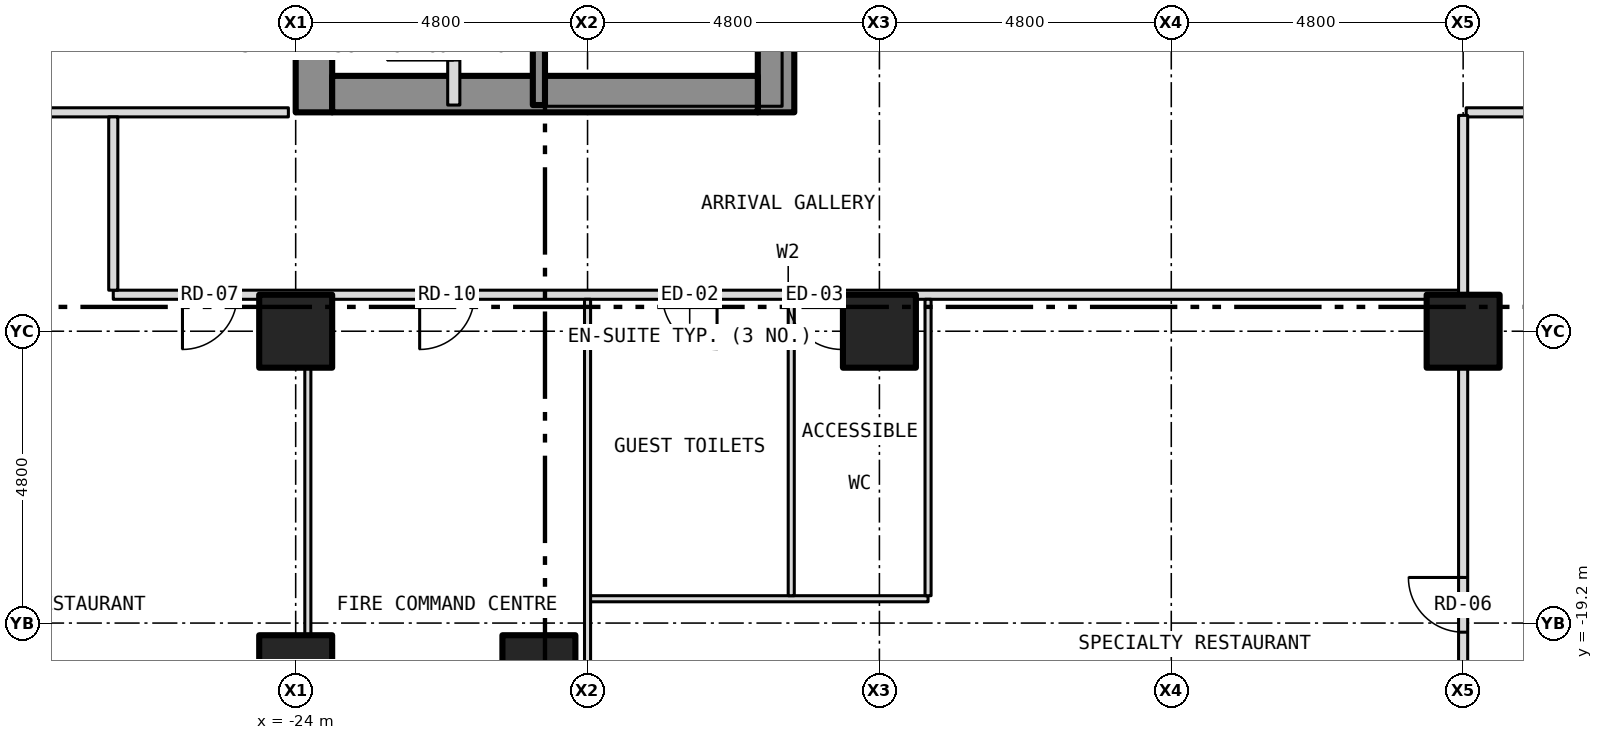
"""IFC4 building model, lengths in metres.
Left out: names, types, materials, properties, quantities, classifications, styles, units other than length and angle.
Written with IfcOpenShell. Run it as: python <this file> out.ifc"""

import sys

from ifc_helpers import new_model, si_unit, direction, frame, frame_2d, origin, origin_2d, place, context, subcontext, project, spatial, rectangle, hollow_rectangle, extrude, element, fill, save


model = new_model("IFC4")
c1 = context("Model", 3, precision=1e-05, world=origin(), true_north=direction((0.0, 1.0)))
c2 = subcontext(c1, "Body", "Model", "MODEL_VIEW")
j1 = project(units=[si_unit("LENGTHUNIT", "METRE"), si_unit("PLANEANGLEUNIT", "RADIAN")], contexts=[c1])
p1 = place(None, origin())
s1 = spatial("IfcSite", under=j1, at=p1, CompositionType="ELEMENT")
p2 = place(p1, origin())
s2 = spatial("IfcBuilding", under=s1, at=p2, CompositionType="ELEMENT")
p3 = place(p2, origin())
s3 = spatial("IfcBuildingStorey", under=s2, at=p3, CompositionType="ELEMENT", Elevation=0.0)
for number, where, z_axis, x_axis in (
    (1, (-24.0, -20.0, -0.3), (0.0, 0.0, 1.0), (1.0, 0.0, 0.0)),
    (2, (-24.0, -14.4, -0.3), (0.0, 0.0, 1.0), (1.0, 0.0, 0.0)),
    (3, (-20.0, -20.0, -0.3), (0.0, 0.0, 1.0), (1.0, 0.0, 0.0)),
    (4, (-14.4, -14.4, -0.3), (0.0, 0.0, 1.0), (1.0, 0.0, 0.0)),
    (5, (-4.8, -14.4, -0.3), (0.0, 0.0, 1.0), (1.0, 0.0, 0.0)),
):
    element("IfcColumn", number, at=place(p3, frame(where, z_axis=z_axis, x_axis=x_axis)), inside=s3, PredefinedType="COLUMN", context=c2, shape_type="SweptSolid", body=[
        extrude(hollow_rectangle(XDim=1.2, YDim=1.2, WallThickness=0.07, at=origin_2d()), origin(), (0.0, 0.0, 1.0), 7.55),
    ])
p4 = place(p3, frame((-16.1, -10.8, 0.0), z_axis=(0.0, 0.0, 1.0), x_axis=(0.0, 1.0, 0.0)))
e6 = element("IfcWall", 6, at=p4, inside=s3, PredefinedType="SHEAR", context=c2, shape_type="SweptSolid", body=[
    extrude(rectangle(XDim=21.6, YDim=0.6, at=frame_2d((10.8, 0.0))), origin(), (0.0, 0.0, 1.0), 7.2),
])
p5 = place(p4, frame((9.4, 0.0, 0.0)))
e7 = element("IfcOpeningElement", 7, at=p5, cuts=e6, PredefinedType="OPENING", context=c2, shape_type="SweptSolid", body=[
    extrude(rectangle(XDim=1.1, YDim=2.1, at=frame_2d((0.55, 1.05))), frame((0.0, 0.312, 0.0), z_axis=(0.0, -1.0, 0.0), x_axis=(1.0, 0.0, 0.0)), (0.0, 0.0, 1.0), 0.624),
])
p6 = place(p4, frame((11.5, 0.0, 0.0)))
e8 = element("IfcOpeningElement", 8, at=p6, cuts=e6, PredefinedType="OPENING", context=c2, shape_type="SweptSolid", body=[
    extrude(rectangle(XDim=1.1, YDim=2.1, at=frame_2d((0.55, 1.05))), frame((0.0, 0.312, 0.0), z_axis=(0.0, -1.0, 0.0), x_axis=(1.0, 0.0, 0.0)), (0.0, 0.0, 1.0), 0.624),
])
p7 = place(p4, frame((13.6, 0.0, 0.0)))
e9 = element("IfcOpeningElement", 9, at=p7, cuts=e6, PredefinedType="OPENING", context=c2, shape_type="SweptSolid", body=[
    extrude(rectangle(XDim=1.1, YDim=2.1, at=frame_2d((0.55, 1.05))), frame((0.0, 0.312, 0.0), z_axis=(0.0, -1.0, 0.0), x_axis=(1.0, 0.0, 0.0)), (0.0, 0.0, 1.0), 0.624),
])
p8 = place(p4, frame((15.7, 0.0, 0.0)))
e10 = element("IfcOpeningElement", 10, at=p8, cuts=e6, PredefinedType="OPENING", context=c2, shape_type="SweptSolid", body=[
    extrude(rectangle(XDim=1.1, YDim=2.1, at=frame_2d((0.55, 1.05))), frame((0.0, 0.312, 0.0), z_axis=(0.0, -1.0, 0.0), x_axis=(1.0, 0.0, 0.0)), (0.0, 0.0, 1.0), 0.624),
])
p9 = place(p4, frame((17.8, 0.0, 0.0)))
e11 = element("IfcOpeningElement", 11, at=p9, cuts=e6, PredefinedType="OPENING", context=c2, shape_type="SweptSolid", body=[
    extrude(rectangle(XDim=1.1, YDim=2.1, at=frame_2d((0.55, 1.05))), frame((0.0, 0.312, 0.0), z_axis=(0.0, -1.0, 0.0), x_axis=(1.0, 0.0, 0.0)), (0.0, 0.0, 1.0), 0.624),
])
p10 = place(p4, frame((19.9, 0.0, 0.0)))
e12 = element("IfcOpeningElement", 12, at=p10, cuts=e6, PredefinedType="OPENING", context=c2, shape_type="SweptSolid", body=[
    extrude(rectangle(XDim=1.1, YDim=2.1, at=frame_2d((0.55, 1.05))), frame((0.0, 0.312, 0.0), z_axis=(0.0, -1.0, 0.0), x_axis=(1.0, 0.0, 0.0)), (0.0, 0.0, 1.0), 0.624),
])
p11 = place(p3, frame((-23.7, -10.8, 0.0), z_axis=(0.0, 0.0, 1.0), x_axis=(0.0, 1.0, 0.0)))
e13 = element("IfcWall", 13, at=p11, inside=s3, PredefinedType="SHEAR", context=c2, shape_type="SweptSolid", body=[
    extrude(rectangle(XDim=21.6, YDim=0.6, at=frame_2d((10.8, 0.0))), origin(), (0.0, 0.0, 1.0), 7.2),
])
p12 = place(p3, frame((-23.4, -10.5, 0.0), z_axis=(0.0, 0.0, 1.0), x_axis=(1.0, 0.0, 0.0)))
e14 = element("IfcWall", 14, at=p12, inside=s3, PredefinedType="SHEAR", context=c2, shape_type="SweptSolid", body=[
    extrude(rectangle(XDim=7.0, YDim=0.6, at=frame_2d((3.5, 0.0))), origin(), (0.0, 0.0, 1.0), 7.2),
])
p13 = place(p3, frame((-19.2, -18.8, 0.0), z_axis=(0.0, 0.0, 1.0), x_axis=(1.0, 0.0, 0.0)))
e15 = element("IfcWall", 15, at=p13, inside=s3, PredefinedType="PARTITIONING", context=c2, shape_type="SweptSolid", body=[
    extrude(rectangle(XDim=5.6, YDim=0.1, at=frame_2d((2.8, 0.0))), origin(), (0.0, 0.0, 1.0), 7.25),
])
p14 = place(p3, frame((-27.0, -13.8, 0.0), z_axis=(0.0, 0.0, 1.0), x_axis=(1.0, 0.0, 0.0)))
e16 = element("IfcWall", 16, at=p14, inside=s3, PredefinedType="PARTITIONING", context=c2, shape_type="SweptSolid", body=[
    extrude(rectangle(XDim=22.2, YDim=0.15, at=frame_2d((11.1, 0.0))), origin(), (0.0, 0.0, 1.0), 7.25),
])
p15 = place(p14, frame((9.03, 0.0, 0.0)))
e17 = element("IfcOpeningElement", 17, at=p15, cuts=e16, PredefinedType="OPENING", context=c2, shape_type="SweptSolid", body=[
    extrude(rectangle(XDim=0.9, YDim=2.1, at=frame_2d((0.45, 1.05))), frame((0.0, 0.087, 0.0), z_axis=(0.0, -1.0, 0.0), x_axis=(1.0, 0.0, 0.0)), (0.0, 0.0, 1.0), 0.174),
])
p16 = place(p14, frame((11.08, 0.0, 0.0)))
e18 = element("IfcOpeningElement", 18, at=p16, cuts=e16, PredefinedType="OPENING", context=c2, shape_type="SweptSolid", body=[
    extrude(rectangle(XDim=0.9, YDim=2.1, at=frame_2d((0.45, 1.05))), frame((0.0, 0.087, 0.0), z_axis=(0.0, -1.0, 0.0), x_axis=(1.0, 0.0, 0.0)), (0.0, 0.0, 1.0), 0.174),
])
p17 = place(p14, frame((1.138, 0.0, 0.0)))
e19 = element("IfcOpeningElement", 19, at=p17, cuts=e16, PredefinedType="OPENING", context=c2, shape_type="SweptSolid", body=[
    extrude(rectangle(XDim=0.9, YDim=2.1, at=frame_2d((0.45, 1.05))), frame((0.0, 0.087, 0.0), z_axis=(0.0, -1.0, 0.0), x_axis=(1.0, 0.0, 0.0)), (0.0, 0.0, 1.0), 0.174),
])
p18 = place(p14, frame((5.039, 0.0, 0.0)))
e20 = element("IfcOpeningElement", 20, at=p18, cuts=e16, PredefinedType="OPENING", context=c2, shape_type="SweptSolid", body=[
    extrude(rectangle(XDim=0.9, YDim=2.1, at=frame_2d((0.45, 1.05))), frame((0.0, 0.087, 0.0), z_axis=(0.0, -1.0, 0.0), x_axis=(1.0, 0.0, 0.0)), (0.0, 0.0, 1.0), 0.174),
])
p19 = place(p3, frame((-36.9, -10.8, 0.0), z_axis=(0.0, 0.0, 1.0), x_axis=(1.0, 0.0, 0.0)))
e21 = element("IfcWall", 21, at=p19, inside=s3, PredefinedType="PARTITIONING", context=c2, shape_type="SweptSolid", body=[
    extrude(rectangle(XDim=12.78, YDim=0.15, at=frame_2d((6.39, 0.0))), origin(), (0.0, 0.0, 1.0), 7.25),
])
p20 = place(p3, frame((-4.75, -10.8, 0.0), z_axis=(0.0, 0.0, 1.0), x_axis=(1.0, 0.0, 0.0)))
e22 = element("IfcWall", 22, at=p20, inside=s3, PredefinedType="PARTITIONING", context=c2, shape_type="SweptSolid", body=[
    extrude(rectangle(XDim=9.5, YDim=0.15, at=frame_2d((4.75, 0.0))), origin(), (0.0, 0.0, 1.0), 7.25),
])
p21 = place(p20, frame((3.85, 0.0, 0.0)))
e23 = element("IfcOpeningElement", 23, at=p21, cuts=e22, PredefinedType="OPENING", context=c2, shape_type="SweptSolid", body=[
    extrude(rectangle(XDim=1.8, YDim=2.1, at=frame_2d((0.9, 1.05))), frame((0.0, 0.087, 0.0), z_axis=(0.0, -1.0, 0.0), x_axis=(1.0, 0.0, 0.0)), (0.0, 0.0, 1.0), 0.174),
])
p22 = place(p3, frame((-27.0, -13.725, 0.0), z_axis=(0.0, 0.0, 1.0), x_axis=(0.0, 1.0, 0.0)))
e24 = element("IfcWall", 24, at=p22, inside=s3, PredefinedType="PARTITIONING", context=c2, shape_type="SweptSolid", body=[
    extrude(rectangle(XDim=2.85, YDim=0.15, at=frame_2d((1.425, 0.0))), origin(), (0.0, 0.0, 1.0), 7.25),
])
p23 = place(p3, frame((-23.8, -20.6, 0.0), z_axis=(0.0, 0.0, 1.0), x_axis=(0.0, 1.0, 0.0)))
e25 = element("IfcWall", 25, at=p23, inside=s3, PredefinedType="PARTITIONING", context=c2, shape_type="SweptSolid", body=[
    extrude(rectangle(XDim=1.2, YDim=0.1, at=frame_2d((0.6, 0.0))), origin(), (0.0, 0.0, 1.0), 7.25),
])
p24 = place(p3, frame((-23.8, -19.4, 0.0), z_axis=(0.0, 0.0, 1.0), x_axis=(0.0, 1.0, 0.0)))
e26 = element("IfcWall", 26, at=p24, inside=s3, PredefinedType="PARTITIONING", context=c2, shape_type="SweptSolid", body=[
    extrude(rectangle(XDim=4.4, YDim=0.1, at=frame_2d((2.2, 0.0))), origin(), (0.0, 0.0, 1.0), 6.323),
])
p25 = place(p3, frame((-23.8, -15.0, 0.0), z_axis=(0.0, 0.0, 1.0), x_axis=(0.0, 1.0, 0.0)))
e27 = element("IfcWall", 27, at=p25, inside=s3, PredefinedType="PARTITIONING", context=c2, shape_type="SweptSolid", body=[
    extrude(rectangle(XDim=1.125, YDim=0.1, at=frame_2d((0.562, 0.0))), origin(), (0.0, 0.0, 1.0), 7.25),
])
p26 = place(p3, frame((-21.4, -10.68, 0.0), z_axis=(0.0, 0.0, 1.0), x_axis=(0.0, 1.0, 0.0)))
e28 = element("IfcWall", 28, at=p26, inside=s3, PredefinedType="PARTITIONING", context=c2, shape_type="SweptSolid", body=[
    extrude(rectangle(XDim=8.68, YDim=0.2, at=frame_2d((4.34, 0.0))), origin(), (0.0, 0.0, 1.0), 7.2),
])
p27 = place(p26, frame((5.66, 0.0, 0.0)))
e29 = element("IfcOpeningElement", 29, at=p27, cuts=e28, PredefinedType="OPENING", context=c2, shape_type="SweptSolid", body=[
    extrude(rectangle(XDim=0.9, YDim=2.1, at=frame_2d((0.45, 1.05))), frame((0.0, 0.112, 0.0), z_axis=(0.0, -1.0, 0.0), x_axis=(1.0, 0.0, 0.0)), (0.0, 0.0, 1.0), 0.224),
])
p28 = place(p26, frame((0.74, 0.0, 0.0)))
e30 = element("IfcOpeningElement", 30, at=p28, cuts=e28, PredefinedType="OPENING", context=c2, shape_type="SweptSolid", body=[
    extrude(rectangle(XDim=1.1, YDim=2.1, at=frame_2d((0.55, 1.05))), frame((0.0, 0.112, 0.0), z_axis=(0.0, -1.0, 0.0), x_axis=(1.0, 0.0, 0.0)), (0.0, 0.0, 1.0), 0.224),
])
p29 = place(p3, frame((-20.0, -10.68, 0.0), z_axis=(0.0, 0.0, 1.0), x_axis=(0.0, 1.0, 0.0)))
e31 = element("IfcWall", 31, at=p29, inside=s3, PredefinedType="SHEAR", context=c2, shape_type="SweptSolid", body=[
    extrude(rectangle(XDim=6.98, YDim=0.2, at=frame_2d((3.49, 0.0))), origin(), (0.0, 0.0, 1.0), 7.2),
])
p30 = place(p29, frame((2.93, 0.0, 0.0)))
e32 = element("IfcOpeningElement", 32, at=p30, cuts=e31, PredefinedType="OPENING", context=c2, shape_type="SweptSolid", body=[
    extrude(rectangle(XDim=1.1, YDim=2.1, at=frame_2d((0.55, 1.05))), frame((0.0, 0.112, 0.0), z_axis=(0.0, -1.0, 0.0), x_axis=(1.0, 0.0, 0.0)), (0.0, 0.0, 1.0), 0.224),
])
p31 = place(p3, frame((-19.2, -24.63, 0.0), z_axis=(0.0, 0.0, 1.0), x_axis=(0.0, 1.0, 0.0)))
e33 = element("IfcWall", 33, at=p31, inside=s3, PredefinedType="PARTITIONING", context=c2, shape_type="SweptSolid", body=[
    extrude(rectangle(XDim=10.076, YDim=0.1, at=frame_2d((5.038, 0.0))), origin(), (0.0, 0.0, 1.0), 6.633),
])
p32 = place(p3, frame((-19.2, -14.554, 0.0), z_axis=(0.0, 0.0, 1.0), x_axis=(0.0, 1.0, 0.0)))
e34 = element("IfcWall", 34, at=p32, inside=s3, PredefinedType="PARTITIONING", context=c2, shape_type="SweptSolid", body=[
    extrude(rectangle(XDim=0.679, YDim=0.1, at=frame_2d((0.339, 0.0))), origin(), (0.0, 0.0, 1.0), 7.25),
])
for number, where, z_axis, x_axis in (
    (35, (-15.85, -18.75, 0.0), (0.0, 0.0, 1.0), (0.0, 1.0, 0.0)),
    (36, (-13.6, -18.75, 0.0), (0.0, 0.0, 1.0), (0.0, 1.0, 0.0)),
):
    element("IfcWall", number, at=place(p3, frame(where, z_axis=z_axis, x_axis=x_axis)), inside=s3, PredefinedType="PARTITIONING", context=c2, shape_type="SweptSolid", body=[
        extrude(rectangle(XDim=4.875, YDim=0.1, at=frame_2d((2.438, 0.0))), origin(), (0.0, 0.0, 1.0), 7.25),
    ])
p33 = place(p3, frame((-4.8, -23.4, 0.0), z_axis=(0.0, 0.0, 1.0), x_axis=(0.0, 1.0, 0.0)))
e37 = element("IfcWall", 37, at=p33, inside=s3, PredefinedType="PARTITIONING", context=c2, shape_type="SweptSolid", body=[
    extrude(rectangle(XDim=8.4, YDim=0.15, at=frame_2d((4.2, 0.0))), origin(), (0.0, 0.0, 1.0), 6.323),
])
p34 = place(p33, frame((4.05, 0.0, 0.0)))
e38 = element("IfcOpeningElement", 38, at=p34, cuts=e37, PredefinedType="OPENING", context=c2, shape_type="SweptSolid", body=[
    extrude(rectangle(XDim=0.9, YDim=2.1, at=frame_2d((0.45, 1.05))), frame((0.0, 0.087, 0.0), z_axis=(0.0, -1.0, 0.0), x_axis=(1.0, 0.0, 0.0)), (0.0, 0.0, 1.0), 0.174),
])
p35 = place(p3, frame((-4.8, -15.0, 0.0), z_axis=(0.0, 0.0, 1.0), x_axis=(0.0, 1.0, 0.0)))
e39 = element("IfcWall", 39, at=p35, inside=s3, PredefinedType="PARTITIONING", context=c2, shape_type="SweptSolid", body=[
    extrude(rectangle(XDim=1.2, YDim=0.15, at=frame_2d((0.6, 0.0))), origin(), (0.0, 0.0, 1.0), 7.25),
])
p36 = place(p3, frame((-4.8, -13.8, 0.0), z_axis=(0.0, 0.0, 1.0), x_axis=(0.0, 1.0, 0.0)))
e40 = element("IfcWall", 40, at=p36, inside=s3, PredefinedType="PARTITIONING", context=c2, shape_type="SweptSolid", body=[
    extrude(rectangle(XDim=2.95, YDim=0.15, at=frame_2d((1.475, 0.0))), origin(), (0.0, 0.0, 1.0), 6.323),
])
p37 = place(p28, origin())
e41 = element("IfcDoor", 41, at=p37, inside=s3, OperationType="SINGLE_SWING_LEFT", PredefinedType="DOOR", context=c2, shape_type="SweptSolid", body=[
    extrude(rectangle(XDim=1.1, YDim=2.1, at=frame_2d((0.55, 1.05))), frame((0.0, 0.025, 0.0), z_axis=(0.0, -1.0, 0.0), x_axis=(1.0, 0.0, 0.0)), (0.0, 0.0, 1.0), 0.05),
])
fill(e30, e41)
p38 = place(p15, origin())
e42 = element("IfcDoor", 42, at=p38, inside=s3, OperationType="SINGLE_SWING_RIGHT", PredefinedType="DOOR", context=c2, shape_type="SweptSolid", body=[
    extrude(rectangle(XDim=0.9, YDim=2.1, at=frame_2d((0.45, 1.05))), frame((0.0, 0.025, 0.0), z_axis=(0.0, -1.0, 0.0), x_axis=(1.0, 0.0, 0.0)), (0.0, 0.0, 1.0), 0.05),
])
fill(e17, e42)
p39 = place(p16, origin())
e43 = element("IfcDoor", 43, at=p39, inside=s3, OperationType="SINGLE_SWING_RIGHT", PredefinedType="DOOR", context=c2, shape_type="SweptSolid", body=[
    extrude(rectangle(XDim=0.9, YDim=2.1, at=frame_2d((0.45, 1.05))), frame((0.0, 0.025, 0.0), z_axis=(0.0, -1.0, 0.0), x_axis=(1.0, 0.0, 0.0)), (0.0, 0.0, 1.0), 0.05),
])
fill(e18, e43)
p40 = place(p34, origin())
e44 = element("IfcDoor", 44, at=p40, inside=s3, OperationType="SINGLE_SWING_RIGHT", PredefinedType="DOOR", context=c2, shape_type="SweptSolid", body=[
    extrude(rectangle(XDim=0.9, YDim=2.1, at=frame_2d((0.45, 1.05))), frame((0.0, 0.025, 0.0), z_axis=(0.0, -1.0, 0.0), x_axis=(1.0, 0.0, 0.0)), (0.0, 0.0, 1.0), 0.05),
])
fill(e38, e44)
p41 = place(p17, origin())
e45 = element("IfcDoor", 45, at=p41, inside=s3, OperationType="SINGLE_SWING_LEFT", PredefinedType="DOOR", context=c2, shape_type="SweptSolid", body=[
    extrude(rectangle(XDim=0.9, YDim=2.1, at=frame_2d((0.45, 1.05))), frame((0.0, 0.025, 0.0), z_axis=(0.0, -1.0, 0.0), x_axis=(1.0, 0.0, 0.0)), (0.0, 0.0, 1.0), 0.05),
])
fill(e19, e45)
p42 = place(p18, origin())
e46 = element("IfcDoor", 46, at=p42, inside=s3, OperationType="SINGLE_SWING_LEFT", PredefinedType="DOOR", context=c2, shape_type="SweptSolid", body=[
    extrude(rectangle(XDim=0.9, YDim=2.1, at=frame_2d((0.45, 1.05))), frame((0.0, 0.025, 0.0), z_axis=(0.0, -1.0, 0.0), x_axis=(1.0, 0.0, 0.0)), (0.0, 0.0, 1.0), 0.05),
])
fill(e20, e46)
save(model, sys.argv[1])
